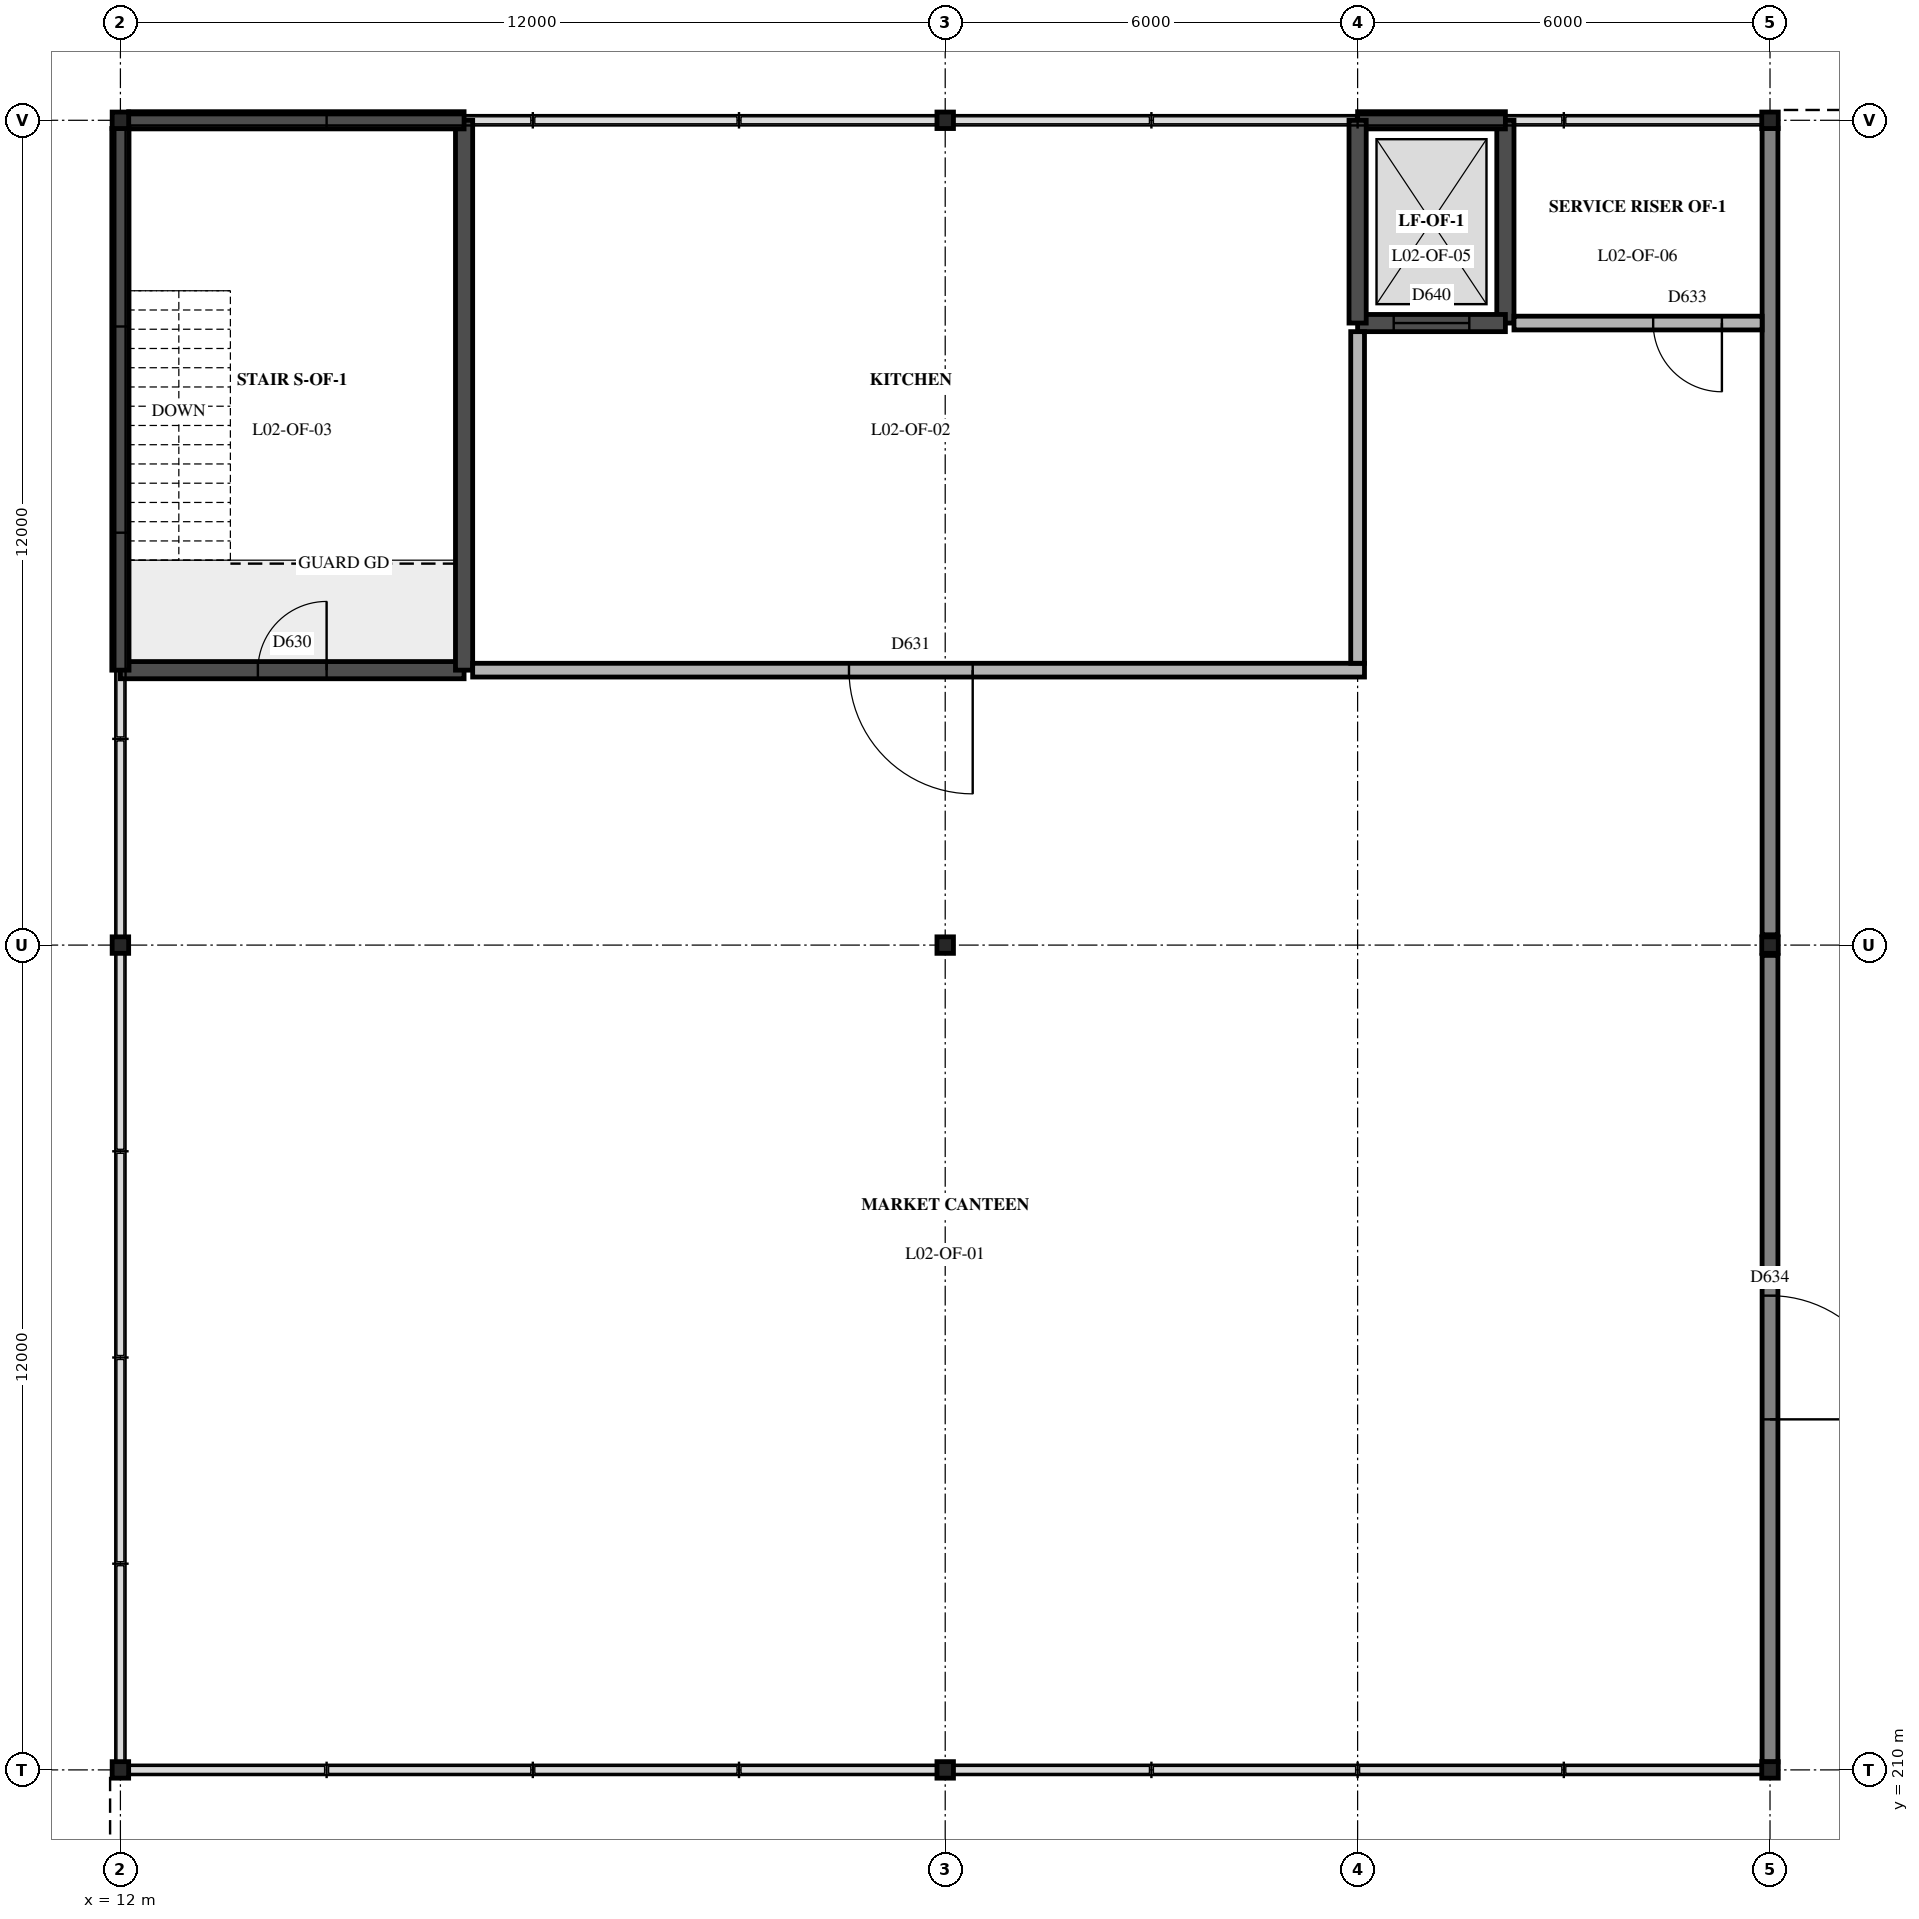
"""IFC4 building model, lengths in metres.
Left out: names, types, materials, properties, quantities, classifications, styles, units other than length and angle.
Written with IfcOpenShell. Run it as: python <this file> out.ifc"""

import sys

from ifc_helpers import new_model, si_unit, direction, frame, frame_2d, origin, origin_2d, place, context, subcontext, project, spatial, rectangle, i_section, extrude, element, fill, save


model = new_model("IFC4")
c1 = context("Model", 3, precision=1e-05, world=origin(), true_north=direction((0.0, 1.0)))
c2 = subcontext(c1, "Body", "Model", "MODEL_VIEW")
j1 = project(units=[si_unit("LENGTHUNIT", "METRE"), si_unit("PLANEANGLEUNIT", "RADIAN")], contexts=[c1])
p1 = place(None, origin())
s1 = spatial("IfcSite", under=j1, at=p1, CompositionType="ELEMENT")
p2 = place(p1, origin())
s2 = spatial("IfcBuilding", under=s1, at=p2, CompositionType="ELEMENT")
p3 = place(p2, frame((0.0, 0.0, 10.8)))
s3 = spatial("IfcBuildingStorey", under=s2, at=p3, CompositionType="ELEMENT", Elevation=10.8)
for number, where, z_axis, x_axis in (
    (1, (12.0, 210.0, 0.0), (0.0, 0.0, 1.0), (1.0, 0.0, 0.0)),
    (2, (12.0, 222.0, 0.0), (0.0, 0.0, 1.0), (1.0, 0.0, 0.0)),
    (3, (12.0, 234.0, 0.0), (0.0, 0.0, 1.0), (1.0, 0.0, 0.0)),
    (4, (24.0, 210.0, 0.0), (0.0, 0.0, 1.0), (1.0, 0.0, 0.0)),
    (5, (24.0, 222.0, 0.0), (0.0, 0.0, 1.0), (1.0, 0.0, 0.0)),
    (6, (24.0, 234.0, 0.0), (0.0, 0.0, 1.0), (1.0, 0.0, 0.0)),
    (7, (36.0, 210.0, 0.0), (0.0, 0.0, 1.0), (1.0, 0.0, 0.0)),
    (8, (36.0, 222.0, 0.0), (0.0, 0.0, 1.0), (1.0, 0.0, 0.0)),
    (9, (36.0, 234.0, 0.0), (0.0, 0.0, 1.0), (1.0, 0.0, 0.0)),
):
    element("IfcColumn", number, at=place(p3, frame(where, z_axis=z_axis, x_axis=x_axis)), inside=s3, PredefinedType="COLUMN", context=c2, shape_type="SweptSolid", body=[
        extrude(i_section(OverallWidth=0.24, OverallDepth=0.24, WebThickness=0.01, FlangeThickness=0.017, at=origin_2d()), origin(), (0.0, 0.0, 1.0), 4.83),
    ])
p4 = place(p3, frame((12.0, 226.0, 0.0), z_axis=(0.0, 0.0, 1.0), x_axis=(1.0, 0.0, 0.0)))
e10 = element("IfcWall", 10, at=p4, inside=s3, PredefinedType="SHEAR", context=c2, shape_type="SweptSolid", body=[
    extrude(rectangle(XDim=5.0, YDim=0.25, at=frame_2d((2.5, 0.0))), origin(), (0.0, 0.0, 1.0), 5.15),
])
p5 = place(p4, frame((2.0, 0.0, 0.0)))
e11 = element("IfcOpeningElement", 11, at=p5, cuts=e10, PredefinedType="OPENING", context=c2, shape_type="SweptSolid", body=[
    extrude(rectangle(XDim=1.0, YDim=2.1, at=frame_2d((0.5, 1.05))), frame((0.0, 0.135, 0.0), z_axis=(0.0, -1.0, 0.0), x_axis=(1.0, 0.0, 0.0)), (0.0, 0.0, 1.0), 0.27),
])
p6 = place(p3, frame((17.0, 226.0, 0.0), z_axis=(0.0, 0.0, 1.0), x_axis=(0.0, 1.0, 0.0)))
e12 = element("IfcWall", 12, at=p6, inside=s3, PredefinedType="SHEAR", context=c2, shape_type="SweptSolid", body=[
    extrude(rectangle(XDim=8.0, YDim=0.25, at=frame_2d((4.0, 0.0))), origin(), (0.0, 0.0, 1.0), 5.15),
])
p7 = place(p3, frame((12.12, 234.0, 0.0), z_axis=(0.0, 0.0, 1.0), x_axis=(1.0, 0.0, 0.0)))
e13 = element("IfcWall", 13, at=p7, inside=s3, PredefinedType="SHEAR", context=c2, shape_type="SweptSolid", body=[
    extrude(rectangle(XDim=4.88, YDim=0.25, at=frame_2d((2.44, 0.0))), origin(), (0.0, 0.0, 1.0), 5.15),
])
p8 = place(p3, frame((12.0, 226.0, 0.0), z_axis=(0.0, 0.0, 1.0), x_axis=(0.0, 1.0, 0.0)))
e14 = element("IfcWall", 14, at=p8, inside=s3, PredefinedType="SHEAR", context=c2, shape_type="SweptSolid", body=[
    extrude(rectangle(XDim=7.88, YDim=0.25, at=frame_2d((3.94, 0.0))), origin(), (0.0, 0.0, 1.0), 5.15),
])
p9 = place(p3, frame((36.0, 210.115, 0.0), z_axis=(0.0, 0.0, 1.0), x_axis=(0.0, 1.0, 0.0)))
e15 = element("IfcWall", 15, at=p9, inside=s3, PredefinedType="SOLIDWALL", context=c2, shape_type="SweptSolid", body=[
    extrude(rectangle(XDim=11.735, YDim=0.23, at=frame_2d((5.868, 0.0))), origin(), (0.0, 0.0, 1.0), 4.82),
])
p10 = place(p9, frame((6.785, 0.0, 0.0), z_axis=(0.0, 0.0, 1.0), x_axis=(-1.0, 0.0, 0.0)))
e16 = element("IfcOpeningElement", 16, at=p10, cuts=e15, PredefinedType="OPENING", context=c2, shape_type="SweptSolid", body=[
    extrude(rectangle(XDim=1.8, YDim=2.3, at=frame_2d((0.9, 1.15))), frame((0.0, 0.125, 0.0), z_axis=(0.0, -1.0, 0.0), x_axis=(1.0, 0.0, 0.0)), (0.0, 0.0, 1.0), 0.25),
])
p11 = place(p3, frame((36.0, 222.15, 0.0), z_axis=(0.0, 0.0, 1.0), x_axis=(0.0, 1.0, 0.0)))
e17 = element("IfcWall", 17, at=p11, inside=s3, PredefinedType="SOLIDWALL", context=c2, shape_type="SweptSolid", body=[
    extrude(rectangle(XDim=11.735, YDim=0.23, at=frame_2d((5.868, 0.0))), origin(), (0.0, 0.0, 1.0), 4.82),
])
p12 = place(p3, frame((32.15, 231.05, 0.0), z_axis=(0.0, 0.0, 1.0), x_axis=(0.0, 1.0, 0.0)))
e18 = element("IfcWall", 18, at=p12, inside=s3, PredefinedType="SHEAR", context=c2, shape_type="SweptSolid", body=[
    extrude(rectangle(XDim=2.95, YDim=0.25, at=frame_2d((1.475, 0.0))), origin(), (0.0, 0.0, 1.0), 5.28),
])
p13 = place(p3, frame((32.15, 234.0, 0.0), z_axis=(0.0, 0.0, 1.0), x_axis=(-1.0, 0.0, 0.0)))
e19 = element("IfcWall", 19, at=p13, inside=s3, PredefinedType="SHEAR", context=c2, shape_type="SweptSolid", body=[
    extrude(rectangle(XDim=2.15, YDim=0.25, at=frame_2d((1.075, 0.0))), origin(), (0.0, 0.0, 1.0), 5.28),
])
p14 = place(p3, frame((30.0, 231.05, 0.0), z_axis=(0.0, 0.0, 1.0), x_axis=(1.0, 0.0, 0.0)))
e20 = element("IfcWall", 20, at=p14, inside=s3, PredefinedType="SHEAR", context=c2, shape_type="SweptSolid", body=[
    extrude(rectangle(XDim=2.15, YDim=0.25, at=frame_2d((1.075, 0.0))), origin(), (0.0, 0.0, 1.0), 5.28),
])
p15 = place(p14, frame((0.525, 0.0, 0.0)))
e21 = element("IfcOpeningElement", 21, at=p15, cuts=e20, PredefinedType="OPENING", context=c2, shape_type="SweptSolid", body=[
    extrude(rectangle(XDim=1.1, YDim=2.1, at=frame_2d((0.55, 1.05))), frame((0.0, 0.135, 0.0), z_axis=(0.0, -1.0, 0.0), x_axis=(1.0, 0.0, 0.0)), (0.0, 0.0, 1.0), 0.27),
])
p16 = place(p3, frame((30.0, 234.0, 0.0), z_axis=(0.0, 0.0, 1.0), x_axis=(0.0, -1.0, 0.0)))
e22 = element("IfcWall", 22, at=p16, inside=s3, PredefinedType="SHEAR", context=c2, shape_type="SweptSolid", body=[
    extrude(rectangle(XDim=2.95, YDim=0.25, at=frame_2d((1.475, 0.0))), origin(), (0.0, 0.0, 1.0), 5.28),
])
p17 = place(p3, frame((17.125, 226.0, 0.0), z_axis=(0.0, 0.0, 1.0), x_axis=(1.0, 0.0, 0.0)))
e23 = element("IfcWall", 23, at=p17, inside=s3, PredefinedType="PARTITIONING", context=c2, shape_type="SweptSolid", body=[
    extrude(rectangle(XDim=12.975, YDim=0.2, at=frame_2d((6.488, 0.0))), origin(), (0.0, 0.0, 1.0), 4.83),
])
p18 = place(p17, frame((5.475, 0.0, 0.0)))
e24 = element("IfcOpeningElement", 24, at=p18, cuts=e23, PredefinedType="OPENING", context=c2, shape_type="SweptSolid", body=[
    extrude(rectangle(XDim=1.8, YDim=2.1, at=frame_2d((0.9, 1.05))), frame((0.0, 0.11, 0.0), z_axis=(0.0, -1.0, 0.0), x_axis=(1.0, 0.0, 0.0)), (0.0, 0.0, 1.0), 0.22),
])
p19 = place(p3, frame((32.275, 231.05, 0.0), z_axis=(0.0, 0.0, 1.0), x_axis=(1.0, 0.0, 0.0)))
e25 = element("IfcWall", 25, at=p19, inside=s3, PredefinedType="PARTITIONING", context=c2, shape_type="SweptSolid", body=[
    extrude(rectangle(XDim=3.61, YDim=0.2, at=frame_2d((1.805, 0.0))), origin(), (0.0, 0.0, 1.0), 5.15),
])
p20 = place(p19, frame((2.025, 0.0, 0.0)))
e26 = element("IfcOpeningElement", 26, at=p20, cuts=e25, PredefinedType="OPENING", context=c2, shape_type="SweptSolid", body=[
    extrude(rectangle(XDim=1.0, YDim=2.1, at=frame_2d((0.5, 1.05))), frame((0.0, 0.11, 0.0), z_axis=(0.0, -1.0, 0.0), x_axis=(1.0, 0.0, 0.0)), (0.0, 0.0, 1.0), 0.22),
])
p21 = place(p3, frame((30.0, 226.1, 0.0), z_axis=(0.0, 0.0, 1.0), x_axis=(0.0, 1.0, 0.0)))
e27 = element("IfcWall", 27, at=p21, inside=s3, PredefinedType="PARTITIONING", context=c2, shape_type="SweptSolid", body=[
    extrude(rectangle(XDim=4.825, YDim=0.2, at=frame_2d((2.413, 0.0))), origin(), (0.0, 0.0, 1.0), 5.15),
])
p22 = place(p10, origin())
e28 = element("IfcDoor", 28, at=p22, inside=s3, OperationType="DOUBLE_DOOR_SINGLE_SWING", PredefinedType="DOOR", context=c2, shape_type="SweptSolid", body=[
    extrude(rectangle(XDim=1.8, YDim=2.3, at=frame_2d((0.9, 1.15))), frame((0.0, 0.025, 0.0), z_axis=(0.0, -1.0, 0.0), x_axis=(1.0, 0.0, 0.0)), (0.0, 0.0, 1.0), 0.05),
])
fill(e16, e28)
p23 = place(p15, origin())
e29 = element("IfcDoor", 29, at=p23, inside=s3, OperationType="SLIDING_TO_LEFT", PredefinedType="DOOR", context=c2, shape_type="SweptSolid", body=[
    extrude(rectangle(XDim=1.1, YDim=2.1, at=frame_2d((0.55, 1.05))), frame((0.0, 0.025, 0.0), z_axis=(0.0, -1.0, 0.0), x_axis=(1.0, 0.0, 0.0)), (0.0, 0.0, 1.0), 0.05),
])
fill(e21, e29)
p24 = place(p5, origin())
e30 = element("IfcDoor", 30, at=p24, inside=s3, OperationType="SINGLE_SWING_RIGHT", PredefinedType="DOOR", context=c2, shape_type="SweptSolid", body=[
    extrude(rectangle(XDim=1.0, YDim=2.1, at=frame_2d((0.5, 1.05))), frame((0.0, 0.025, 0.0), z_axis=(0.0, -1.0, 0.0), x_axis=(1.0, 0.0, 0.0)), (0.0, 0.0, 1.0), 0.05),
])
fill(e11, e30)
p25 = place(p18, origin())
e31 = element("IfcDoor", 31, at=p25, inside=s3, OperationType="DOUBLE_DOOR_SINGLE_SWING", PredefinedType="DOOR", context=c2, shape_type="SweptSolid", body=[
    extrude(rectangle(XDim=1.8, YDim=2.1, at=frame_2d((0.9, 1.05))), frame((0.0, 0.025, 0.0), z_axis=(0.0, -1.0, 0.0), x_axis=(1.0, 0.0, 0.0)), (0.0, 0.0, 1.0), 0.05),
])
fill(e24, e31)
p26 = place(p20, origin())
e32 = element("IfcDoor", 32, at=p26, inside=s3, OperationType="SINGLE_SWING_LEFT", PredefinedType="DOOR", context=c2, shape_type="SweptSolid", body=[
    extrude(rectangle(XDim=1.0, YDim=2.1, at=frame_2d((0.5, 1.05))), frame((0.0, 0.025, 0.0), z_axis=(0.0, -1.0, 0.0), x_axis=(1.0, 0.0, 0.0)), (0.0, 0.0, 1.0), 0.05),
])
fill(e26, e32)
save(model, sys.argv[1])
